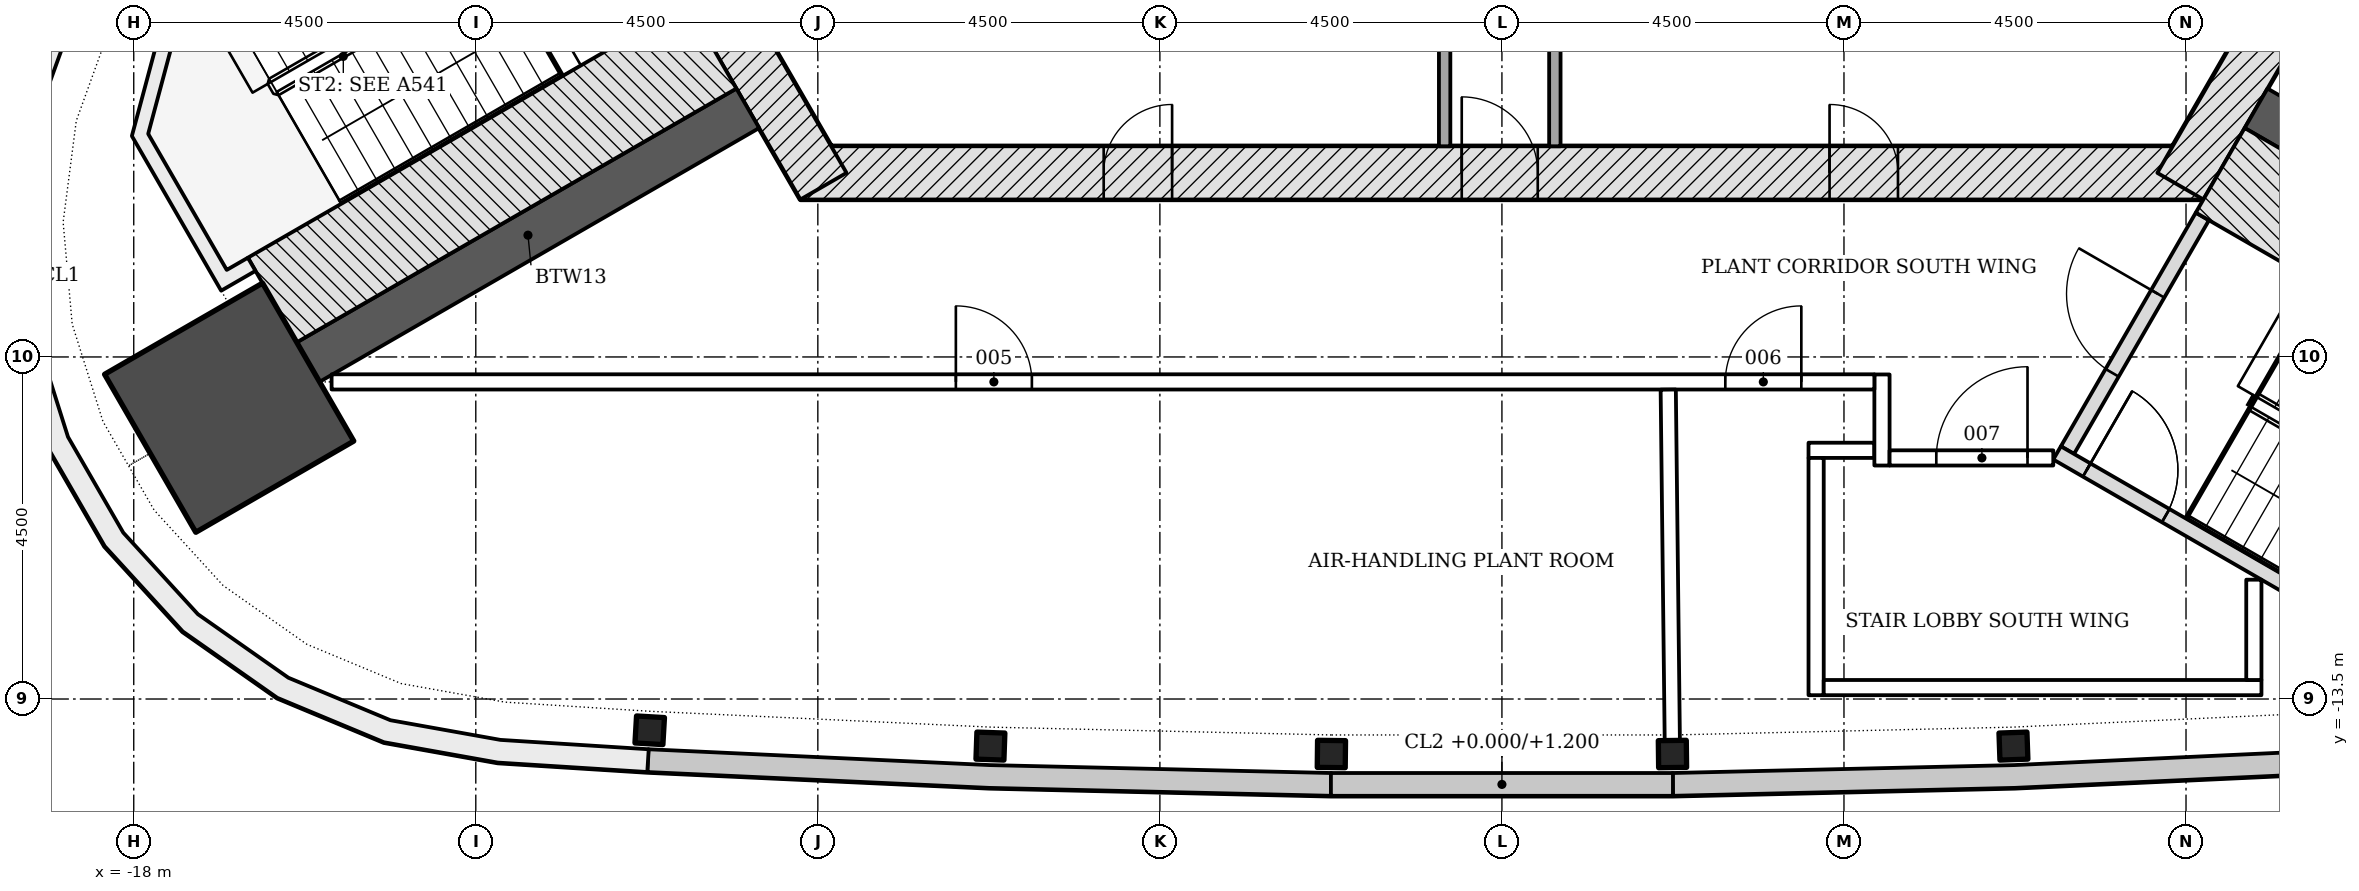
"""IFC4 building model, lengths in metres.
Left out: names, types, materials, properties, quantities, classifications, styles, units other than length and angle.
Written with IfcOpenShell. Run it as: python <this file> out.ifc"""

import sys

from ifc_helpers import new_model, si_unit, direction, frame, frame_2d, origin, origin_2d, place, context, subcontext, project, spatial, polyline, rectangle, i_section, outline, extrude, element, fill, save


model = new_model("IFC4")
c1 = context("Model", 3, precision=1e-05, world=origin(), true_north=direction((0.0, 1.0)))
c2 = subcontext(c1, "Body", "Model", "MODEL_VIEW")
j1 = project(units=[si_unit("LENGTHUNIT", "METRE"), si_unit("PLANEANGLEUNIT", "RADIAN")], contexts=[c1])
p1 = place(None, origin())
s1 = spatial("IfcSite", under=j1, at=p1, CompositionType="ELEMENT")
p2 = place(p1, origin())
s2 = spatial("IfcBuilding", under=s1, at=p2, CompositionType="ELEMENT")
p3 = place(p2, frame((0.0, 0.0, 302.1)))
s3 = spatial("IfcBuildingStorey", under=s2, at=p3, CompositionType="ELEMENT", Elevation=302.1)
p4 = place(p3, frame((-9.229, -6.578, -0.25), z_axis=(0.0, 0.0, 1.0), x_axis=(1.0, 0.0, 0.0)))
e1 = element("IfcWall", 1, at=p4, inside=s3, PredefinedType="SHEAR", context=c2, shape_type="SweptSolid", body=[
    extrude(rectangle(XDim=18.458, YDim=0.7, at=frame_2d((9.229, 0.0))), origin(), (0.0, 0.0, 1.0), 4.5),
])
p5 = place(p4, frame((8.7, 0.0, 0.25)))
e2 = element("IfcOpeningElement", 2, at=p5, cuts=e1, PredefinedType="OPENING", context=c2, shape_type="SweptSolid", body=[
    extrude(rectangle(XDim=1.0, YDim=2.1, at=frame_2d((0.5, 1.05))), frame((0.0, 0.36, 0.0), z_axis=(0.0, -1.0, 0.0), x_axis=(1.0, 0.0, 0.0)), (0.0, 0.0, 1.0), 0.72),
])
p6 = place(p4, frame((3.99, 0.0, 0.25)))
e3 = element("IfcOpeningElement", 3, at=p6, cuts=e1, PredefinedType="OPENING", context=c2, shape_type="SweptSolid", body=[
    extrude(rectangle(XDim=0.9, YDim=2.1, at=frame_2d((0.45, 1.05))), frame((0.0, 0.36, 0.0), z_axis=(0.0, -1.0, 0.0), x_axis=(1.0, 0.0, 0.0)), (0.0, 0.0, 1.0), 0.72),
])
p7 = place(p4, frame((13.539, 0.0, 0.25)))
e4 = element("IfcOpeningElement", 4, at=p7, cuts=e1, PredefinedType="OPENING", context=c2, shape_type="SweptSolid", body=[
    extrude(rectangle(XDim=0.9, YDim=2.1, at=frame_2d((0.45, 1.05))), frame((0.0, 0.36, 0.0), z_axis=(0.0, -1.0, 0.0), x_axis=(1.0, 0.0, 0.0)), (0.0, 0.0, 1.0), 0.72),
])
for number, where, z_axis, x_axis in (
    (5, (8.926, -6.753, -0.25), (0.0, 0.0, 1.0), (0.5, 0.866, 0.0)),
    (6, (-10.311, -4.353, -0.25), (0.0, 0.0, 1.0), (0.5, -0.866, 0.0)),
):
    element("IfcWall", number, at=place(p3, frame(where, z_axis=z_axis, x_axis=x_axis)), inside=s3, PredefinedType="SHEAR", context=c2, shape_type="SweptSolid", body=[
        extrude(rectangle(XDim=2.771, YDim=0.7, at=frame_2d((1.386, 0.0))), origin(), (0.0, 0.0, 1.0), 4.5),
    ])
for number, where, z_axis, x_axis in (
    (7, (-9.922, -5.728, -0.25), (0.0, 0.0, 1.0), (-0.866, -0.5, 0.0)),
    (8, (9.922, -5.728, -0.25), (0.0, 0.0, 1.0), (0.866, -0.5, 0.0)),
):
    element("IfcWall", number, at=place(p3, frame(where, z_axis=z_axis, x_axis=x_axis)), inside=s3, PredefinedType="SHEAR", context=c2, shape_type="SweptSolid", body=[
        extrude(rectangle(XDim=6.678, YDim=0.6, at=frame_2d((3.339, 0.0))), origin(), (0.0, 0.0, 1.0), 4.5),
    ])
p8 = place(p3, frame((-16.745, -9.667, -0.25), z_axis=(0.0, 0.0, 1.0), x_axis=(-0.866025403784, -0.5, 0.0)))
e9 = element("IfcColumn", 9, at=p8, inside=s3, PredefinedType="COLUMN", context=c2, shape_type="SweptSolid", body=[
    extrude(rectangle(XDim=2.4, YDim=2.4, at=origin_2d()), origin(), (0.0, 0.0, 1.0), 4.5),
])
for number, where, z_axis, x_axis in (
    (10, (-11.212, -13.911, -0.25), (0.0, 0.0, 1.0), (0.998, -0.058, 0.0)),
    (11, (-6.729, -14.119, -0.25), (0.0, 0.0, 1.0), (0.999, -0.035, 0.0)),
    (12, (-2.244, -14.224, -0.25), (0.0, 0.0, 1.0), (1.0, -0.012, 0.0)),
    (13, (2.244, -14.224, -0.25), (0.0, 0.0, 1.0), (1.0, 0.012, 0.0)),
    (14, (6.729, -14.119, -0.25), (0.0, 0.0, 1.0), (0.999, 0.035, 0.0)),
):
    element("IfcColumn", number, at=place(p3, frame(where, z_axis=z_axis, x_axis=x_axis)), inside=s3, PredefinedType="COLUMN", context=c2, shape_type="SweptSolid", body=[
        extrude(i_section(OverallWidth=0.368, OverallDepth=0.356, WebThickness=0.011, FlangeThickness=0.018, FilletRadius=0.015, at=origin_2d()), origin(), (0.0, 0.0, 1.0), 4.5),
    ])
p9 = place(p3, origin())
e15 = element("IfcWall", 15, at=p9, inside=s3, PredefinedType="NOTDEFINED", context=c2, shape_type="SweptSolid", body=[
    extrude(outline(polyline([(-11.244, -14.46), (-6.749, -14.669), (-2.25, -14.773), (-2.243, -14.474), (-6.738, -14.369), (-11.23, -14.161), (-11.244, -14.46)])), origin(), (0.0, 0.0, 1.0), 4.25),
])
p10 = place(p3, origin())
e16 = element("IfcWall", 16, at=p10, inside=s3, PredefinedType="NOTDEFINED", context=c2, shape_type="SweptSolid", body=[
    extrude(outline(polyline([(2.25, -14.773), (6.749, -14.669), (11.244, -14.46), (11.23, -14.161), (6.738, -14.369), (2.243, -14.474), (2.25, -14.773)])), origin(), (0.0, 0.0, 1.0), 4.25),
])
p11 = place(p3, origin())
e17 = element("IfcWall", 17, at=p11, inside=s3, PredefinedType="NOTDEFINED", context=c2, shape_type="SweptSolid", body=[
    extrude(outline(polyline([(-2.25, -14.773), (2.25, -14.773), (2.25, -14.473), (-2.25, -14.473), (-2.25, -14.773)])), origin(), (0.0, 0.0, 1.0), 1.2),
])
p12 = place(p3, origin())
e18 = element("IfcWall", 18, at=p12, inside=s3, PredefinedType="NOTDEFINED", context=c2, shape_type="SweptSolid", body=[
    extrude(outline(polyline([(-18.145, -2.507), (-19.021, -4.273), (-19.538, -5.703), (-19.733, -7.21), (-19.599, -8.724), (-19.141, -10.174), (-18.381, -11.49), (-17.355, -12.611), (-16.111, -13.485), (-14.708, -14.069), (-13.211, -14.336), (-11.244, -14.46), (-11.225, -14.161), (-13.176, -14.038), (-14.623, -13.779), (-15.965, -13.22), (-17.156, -12.385), (-18.138, -11.312), (-18.865, -10.052), (-19.303, -8.665), (-19.432, -7.216), (-19.244, -5.774), (-18.745, -4.391), (-17.876, -2.64), (-18.145, -2.507)])), origin(), (0.0, 0.0, 1.0), 4.25),
])
p13 = place(p3, frame((-0.754, 10.756, 0.0), z_axis=(0.0, 0.0, 1.0), x_axis=(0.0, -1.0, 0.0)))
e19 = element("IfcWall", 19, at=p13, inside=s3, PredefinedType="PARTITIONING", context=c2, shape_type="SweptSolid", body=[
    extrude(rectangle(XDim=16.985, YDim=0.15, at=frame_2d((8.492, 0.0))), origin(), (0.0, 0.0, 1.0), 4.25),
])
p14 = place(p13, frame((9.185, 0.0, 0.0)))
e20 = element("IfcOpeningElement", 20, at=p14, cuts=e19, PredefinedType="OPENING", context=c2, shape_type="SweptSolid", body=[
    extrude(rectangle(XDim=0.9, YDim=2.1, at=frame_2d((0.45, 1.05))), frame((0.0, 0.085, 0.0), z_axis=(0.0, -1.0, 0.0), x_axis=(1.0, 0.0, 0.0)), (0.0, 0.0, 1.0), 0.17),
])
p15 = place(p3, frame((0.696, 5.197, 0.0), z_axis=(0.0, 0.0, 1.0), x_axis=(0.0, -1.0, 0.0)))
e21 = element("IfcWall", 21, at=p15, inside=s3, PredefinedType="PARTITIONING", context=c2, shape_type="SweptSolid", body=[
    extrude(rectangle(XDim=11.425, YDim=0.15, at=frame_2d((5.712, 0.0))), origin(), (0.0, 0.0, 1.0), 4.25),
])
p16 = place(p15, frame((3.664, 0.0, 0.0)))
e22 = element("IfcOpeningElement", 22, at=p16, cuts=e21, PredefinedType="OPENING", context=c2, shape_type="SweptSolid", body=[
    extrude(rectangle(XDim=0.9, YDim=2.1, at=frame_2d((0.45, 1.05))), frame((0.0, 0.085, 0.0), z_axis=(0.0, -1.0, 0.0), x_axis=(1.0, 0.0, 0.0)), (0.0, 0.0, 1.0), 0.17),
])
p17 = place(p3, frame((-10.393, -4.912, -0.25), z_axis=(0.0, 0.0, 1.0), x_axis=(-0.866025486527, -0.499999856685, 0.0)))
e23 = element("IfcWall", 23, at=p17, inside=s3, PredefinedType="SHEAR", context=c2, shape_type="SweptSolid", body=[
    extrude(rectangle(XDim=6.679, YDim=1.286, at=frame_2d((3.339, 0.0))), origin(), (0.0, 0.0, 1.0), 4.5),
])
p18 = place(p3, frame((0.0, 0.0, -0.25)))
e24 = element("IfcWall", 24, at=p18, inside=s3, PredefinedType="SHEAR", context=c2, shape_type="SweptSolid", body=[
    extrude(outline(polyline([(-17.439, -3.907), (-18.025, -6.093), (-16.85, -8.128), (-16.398, -7.867), (-16.498, -7.694), (-16.498, -7.694), (-16.777, -7.855), (-17.81, -6.065), (-17.267, -4.039), (-17.339, -4.081), (-17.339, -4.081), (-17.339, -4.081), (-17.339, -4.081), (-17.339, -4.081), (-17.339, -4.081), (-17.339, -4.081), (-17.339, -4.081), (-17.339, -4.081), (-17.339, -4.081), (-17.339, -4.081), (-17.339, -4.081), (-17.339, -4.081), (-17.339, -4.081), (-17.339, -4.081), (-17.339, -4.081), (-17.339, -4.081), (-17.439, -3.907)])), origin(), (0.0, 0.0, 1.0), 4.5),
])
p19 = place(p3, frame((7.44, -10.226, -0.25), z_axis=(0.0, 0.0, 1.0), x_axis=(0.500022077904, 0.866012656725, 0.0)))
e25 = element("IfcWall", 25, at=p19, inside=s3, PredefinedType="SHEAR", context=c2, shape_type="SweptSolid", body=[
    extrude(rectangle(XDim=3.55, YDim=0.2, at=frame_2d((1.775, 0.0))), origin(), (0.0, 0.0, 1.0), 4.5),
])
p20 = place(p19, frame((1.175, 0.0, 0.25)))
e26 = element("IfcOpeningElement", 26, at=p20, cuts=e25, PredefinedType="OPENING", context=c2, shape_type="SweptSolid", body=[
    extrude(rectangle(XDim=1.2, YDim=2.1, at=frame_2d((0.6, 1.05))), frame((0.0, 0.11, 0.0), z_axis=(0.0, -1.0, 0.0), x_axis=(1.0, 0.0, 0.0)), (0.0, 0.0, 1.0), 0.22),
])
p21 = place(p3, frame((7.304, -10.262, -0.25), z_axis=(0.0, 0.0, 1.0), x_axis=(0.866026594901, -0.49999793692, 0.0)))
e27 = element("IfcWall", 27, at=p21, inside=s3, PredefinedType="SHEAR", context=c2, shape_type="SweptSolid", body=[
    extrude(rectangle(XDim=5.6, YDim=0.2, at=frame_2d((2.8, 0.0))), origin(), (0.0, 0.0, 1.0), 4.5),
])
p22 = place(p21, frame((0.45, 0.0, 0.25)))
e28 = element("IfcOpeningElement", 28, at=p22, cuts=e27, PredefinedType="OPENING", context=c2, shape_type="SweptSolid", body=[
    extrude(rectangle(XDim=1.2, YDim=2.1, at=frame_2d((0.6, 1.05))), frame((0.0, 0.11, 0.0), z_axis=(0.0, -1.0, 0.0), x_axis=(1.0, 0.0, 0.0)), (0.0, 0.0, 1.0), 0.22),
])
p23 = place(p3, frame((9.45, -6.545, -0.25), z_axis=(0.0, 0.0, 1.0), x_axis=(0.866016347338, -0.500015685897, 0.0)))
e29 = element("IfcWall", 29, at=p23, inside=s3, PredefinedType="SHEAR", context=c2, shape_type="SweptSolid", body=[
    extrude(rectangle(XDim=6.678, YDim=1.286, at=frame_2d((3.339, 0.0))), origin(), (0.0, 0.0, 1.0), 4.5),
])
p24 = place(p3, frame((4.034, -10.228, 0.0), z_axis=(0.0, 0.0, 1.0), x_axis=(1.0, 0.0, 0.0)))
e30 = element("IfcWall", 30, at=p24, inside=s3, PredefinedType="PARTITIONING", context=c2, shape_type="SweptSolid", body=[
    extrude(rectangle(XDim=0.866, YDim=0.2, at=frame_2d((0.433, 0.0))), origin(), (0.0, 0.0, 1.0), 4.25),
])
p25 = place(p3, frame((5.0, -10.428, 0.0), z_axis=(0.0, 0.0, 1.0), x_axis=(0.0, 1.0, 0.0)))
e31 = element("IfcWall", 31, at=p25, inside=s3, PredefinedType="PARTITIONING", context=c2, shape_type="SweptSolid", body=[
    extrude(rectangle(XDim=1.198, YDim=0.2, at=frame_2d((0.599, 0.0))), origin(), (0.0, 0.0, 1.0), 4.25),
])
p26 = place(p3, frame((5.1, -10.328, 0.0), z_axis=(0.0, 0.0, 1.0), x_axis=(1.0, 0.0, 0.0)))
e32 = element("IfcWall", 32, at=p26, inside=s3, PredefinedType="PARTITIONING", context=c2, shape_type="SweptSolid", body=[
    extrude(rectangle(XDim=2.154, YDim=0.2, at=frame_2d((1.077, 0.0))), origin(), (0.0, 0.0, 1.0), 3.702),
])
p27 = place(p26, frame((0.615, 0.0, 0.0)))
e33 = element("IfcOpeningElement", 33, at=p27, cuts=e32, PredefinedType="OPENING", context=c2, shape_type="SweptSolid", body=[
    extrude(rectangle(XDim=1.2, YDim=2.1, at=frame_2d((0.6, 1.05))), frame((0.0, 0.11, 0.0), z_axis=(0.0, -1.0, 0.0), x_axis=(1.0, 0.0, 0.0)), (0.0, 0.0, 1.0), 0.22),
])
p28 = place(p3, frame((-15.397, -9.328, 0.0), z_axis=(0.0, 0.0, 1.0), x_axis=(1.0, 0.0, 0.0)))
e34 = element("IfcWall", 34, at=p28, inside=s3, PredefinedType="PARTITIONING", context=c2, shape_type="SweptSolid", body=[
    extrude(rectangle(XDim=20.297, YDim=0.2, at=frame_2d((10.148, 0.0))), origin(), (0.0, 0.0, 1.0), 3.702),
])
p29 = place(p28, frame((8.213, 0.0, 0.0)))
e35 = element("IfcOpeningElement", 35, at=p29, cuts=e34, PredefinedType="OPENING", context=c2, shape_type="SweptSolid", body=[
    extrude(rectangle(XDim=1.0, YDim=2.1, at=frame_2d((0.5, 1.05))), frame((0.0, 0.11, 0.0), z_axis=(0.0, -1.0, 0.0), x_axis=(1.0, 0.0, 0.0)), (0.0, 0.0, 1.0), 0.22),
])
p30 = place(p28, frame((18.336, 0.0, 0.0)))
e36 = element("IfcOpeningElement", 36, at=p30, cuts=e34, PredefinedType="OPENING", context=c2, shape_type="SweptSolid", body=[
    extrude(rectangle(XDim=1.0, YDim=2.1, at=frame_2d((0.5, 1.05))), frame((0.0, 0.11, 0.0), z_axis=(0.0, -1.0, 0.0), x_axis=(1.0, 0.0, 0.0)), (0.0, 0.0, 1.0), 0.22),
])
p31 = place(p3, frame((2.188, -9.429, 0.0), z_axis=(0.0, 0.0, 1.0), x_axis=(0.011564782234, -0.99993312567, 0.0)))
e37 = element("IfcWall", 37, at=p31, inside=s3, PredefinedType="PARTITIONING", context=c2, shape_type="SweptSolid", body=[
    extrude(rectangle(XDim=4.644, YDim=0.2, at=frame_2d((2.322, 0.0))), origin(), (0.0, 0.0, 1.0), 3.702),
])
p32 = place(p3, frame((4.134, -10.328, 0.0), z_axis=(0.0, 0.0, 1.0), x_axis=(0.0, -1.0, 0.0)))
e38 = element("IfcWall", 38, at=p32, inside=s3, PredefinedType="PARTITIONING", context=c2, shape_type="SweptSolid", body=[
    extrude(rectangle(XDim=3.122, YDim=0.2, at=frame_2d((1.561, 0.0))), origin(), (0.0, 0.0, 1.0), 4.25),
])
p33 = place(p3, frame((4.234, -13.35, 0.0), z_axis=(0.0, 0.0, 1.0), x_axis=(1.0, 0.0, 0.0)))
e39 = element("IfcWall", 39, at=p33, inside=s3, PredefinedType="PARTITIONING", context=c2, shape_type="SweptSolid", body=[
    extrude(rectangle(XDim=5.759, YDim=0.2, at=frame_2d((2.879, 0.0))), origin(), (0.0, 0.0, 1.0), 3.702),
])
p34 = place(p3, frame((9.893, -13.25, 0.0), z_axis=(0.0, 0.0, 1.0), x_axis=(0.0, 1.0, 0.0)))
e40 = element("IfcWall", 40, at=p34, inside=s3, PredefinedType="PARTITIONING", context=c2, shape_type="SweptSolid", body=[
    extrude(rectangle(XDim=1.32, YDim=0.2, at=frame_2d((0.66, 0.0))), origin(), (0.0, 0.0, 1.0), 4.25),
])
p35 = place(p3, frame((5.455, 8.808, 0.0), z_axis=(0.0, 0.0, 1.0), x_axis=(0.499996641012, -0.866027343088, 0.0)))
e41 = element("IfcWall", 41, at=p35, inside=s3, PredefinedType="PARTITIONING", context=c2, shape_type="SweptSolid", body=[
    extrude(rectangle(XDim=19.937, YDim=0.2, at=frame_2d((9.969, 0.0))), origin(), (0.0, 0.0, 1.0), 3.702),
])
p36 = place(p35, frame((13.097, 0.0, 0.0)))
e42 = element("IfcOpeningElement", 42, at=p36, cuts=e41, PredefinedType="OPENING", context=c2, shape_type="SweptSolid", body=[
    extrude(rectangle(XDim=1.0, YDim=2.1, at=frame_2d((0.5, 1.05))), frame((0.0, 0.11, 0.0), z_axis=(0.0, -1.0, 0.0), x_axis=(1.0, 0.0, 0.0)), (0.0, 0.0, 1.0), 0.22),
])
p37 = place(p35, frame((4.297, 0.0, 0.0)))
e43 = element("IfcOpeningElement", 43, at=p37, cuts=e41, PredefinedType="OPENING", context=c2, shape_type="SweptSolid", body=[
    extrude(rectangle(XDim=1.0, YDim=2.1, at=frame_2d((0.5, 1.05))), frame((0.0, 0.11, 0.0), z_axis=(0.0, -1.0, 0.0), x_axis=(1.0, 0.0, 0.0)), (0.0, 0.0, 1.0), 0.22),
])
p38 = place(p35, frame((0.963, 0.0, 0.0)))
e44 = element("IfcOpeningElement", 44, at=p38, cuts=e41, PredefinedType="OPENING", context=c2, shape_type="SweptSolid", body=[
    extrude(rectangle(XDim=1.0, YDim=2.1, at=frame_2d((0.5, 1.05))), frame((0.0, 0.11, 0.0), z_axis=(0.0, -1.0, 0.0), x_axis=(1.0, 0.0, 0.0)), (0.0, 0.0, 1.0), 0.22),
])
p39 = place(p5, origin())
e45 = element("IfcDoor", 45, at=p39, inside=s3, OperationType="SINGLE_SWING_LEFT", PredefinedType="DOOR", context=c2, shape_type="SweptSolid", body=[
    extrude(rectangle(XDim=1.0, YDim=2.1, at=frame_2d((0.5, 1.05))), frame((0.0, 0.075, 0.0), z_axis=(0.0, -1.0, 0.0), x_axis=(1.0, 0.0, 0.0)), (0.0, 0.0, 1.0), 0.15),
])
fill(e2, e45)
p40 = place(p6, origin())
e46 = element("IfcDoor", 46, at=p40, inside=s3, OperationType="SINGLE_SWING_RIGHT", PredefinedType="DOOR", context=c2, shape_type="SweptSolid", body=[
    extrude(rectangle(XDim=0.9, YDim=2.1, at=frame_2d((0.45, 1.05))), frame((0.0, 0.075, 0.0), z_axis=(0.0, -1.0, 0.0), x_axis=(1.0, 0.0, 0.0)), (0.0, 0.0, 1.0), 0.15),
])
fill(e3, e46)
p41 = place(p7, origin())
e47 = element("IfcDoor", 47, at=p41, inside=s3, OperationType="SINGLE_SWING_LEFT", PredefinedType="DOOR", context=c2, shape_type="SweptSolid", body=[
    extrude(rectangle(XDim=0.9, YDim=2.1, at=frame_2d((0.45, 1.05))), frame((0.0, 0.075, 0.0), z_axis=(0.0, -1.0, 0.0), x_axis=(1.0, 0.0, 0.0)), (0.0, 0.0, 1.0), 0.15),
])
fill(e4, e47)
p42 = place(p20, origin())
e48 = element("IfcDoor", 48, at=p42, inside=s3, OperationType="SINGLE_SWING_RIGHT", PredefinedType="DOOR", context=c2, shape_type="SweptSolid", body=[
    extrude(rectangle(XDim=1.2, YDim=2.1, at=frame_2d((0.6, 1.05))), frame((0.0, 0.025, 0.0), z_axis=(0.0, -1.0, 0.0), x_axis=(1.0, 0.0, 0.0)), (0.0, 0.0, 1.0), 0.05),
])
fill(e26, e48)
p43 = place(p22, origin())
e49 = element("IfcDoor", 49, at=p43, inside=s3, OperationType="SINGLE_SWING_LEFT", PredefinedType="DOOR", context=c2, shape_type="SweptSolid", body=[
    extrude(rectangle(XDim=1.2, YDim=2.1, at=frame_2d((0.6, 1.05))), frame((0.0, 0.025, 0.0), z_axis=(0.0, -1.0, 0.0), x_axis=(1.0, 0.0, 0.0)), (0.0, 0.0, 1.0), 0.05),
])
fill(e28, e49)
p44 = place(p2, frame((0.0, 0.0, 306.6)))
p45 = place(p44, frame((7.304, -10.262, -0.25), z_axis=(0.0, 0.0, 1.0), x_axis=(0.866026594901, -0.49999793692, 0.0)))
p46 = place(p45, frame((0.45, 0.0, 0.25)))
p47 = place(p46, origin())
e50 = element("IfcDoor", 50, at=p47, inside=s3, OperationType="SINGLE_SWING_LEFT", PredefinedType="DOOR", context=c2, shape_type="SweptSolid", body=[
    extrude(rectangle(XDim=1.2, YDim=2.1, at=frame_2d((0.6, 1.05))), frame((0.0, 0.025, 0.0), z_axis=(0.0, -1.0, 0.0), x_axis=(1.0, 0.0, 0.0)), (0.0, 0.0, 1.0), 0.05),
])
p48 = place(p29, origin())
e51 = element("IfcDoor", 51, at=p48, inside=s3, OperationType="SINGLE_SWING_LEFT", PredefinedType="DOOR", context=c2, shape_type="SweptSolid", body=[
    extrude(rectangle(XDim=1.0, YDim=2.1, at=frame_2d((0.5, 1.05))), frame((0.0, 0.025, 0.0), z_axis=(0.0, -1.0, 0.0), x_axis=(1.0, 0.0, 0.0)), (0.0, 0.0, 1.0), 0.05),
])
fill(e35, e51)
p49 = place(p30, origin())
e52 = element("IfcDoor", 52, at=p49, inside=s3, OperationType="SINGLE_SWING_RIGHT", PredefinedType="DOOR", context=c2, shape_type="SweptSolid", body=[
    extrude(rectangle(XDim=1.0, YDim=2.1, at=frame_2d((0.5, 1.05))), frame((0.0, 0.025, 0.0), z_axis=(0.0, -1.0, 0.0), x_axis=(1.0, 0.0, 0.0)), (0.0, 0.0, 1.0), 0.05),
])
fill(e36, e52)
p50 = place(p27, origin())
e53 = element("IfcDoor", 53, at=p50, inside=s3, OperationType="SINGLE_SWING_RIGHT", PredefinedType="DOOR", context=c2, shape_type="SweptSolid", body=[
    extrude(rectangle(XDim=1.2, YDim=2.1, at=frame_2d((0.6, 1.05))), frame((0.0, 0.025, 0.0), z_axis=(0.0, -1.0, 0.0), x_axis=(1.0, 0.0, 0.0)), (0.0, 0.0, 1.0), 0.05),
])
fill(e33, e53)
save(model, sys.argv[1])
